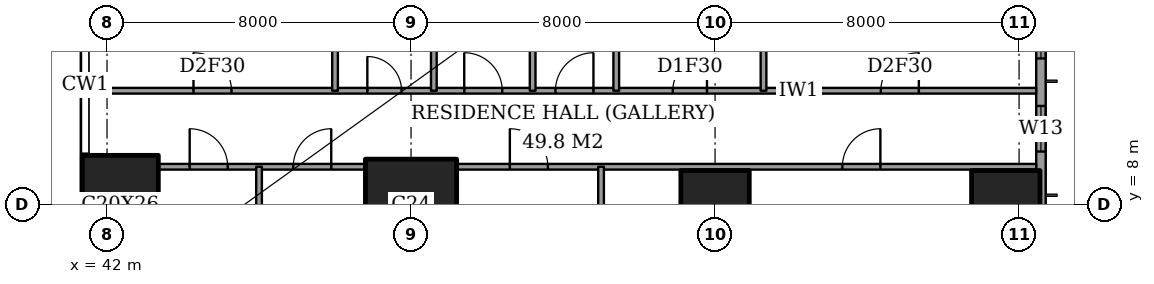
"""IFC4 building model, lengths in metres.
Left out: names, types, materials, properties, quantities, classifications, styles, units other than length and angle.
Written with IfcOpenShell. Run it as: python <this file> out.ifc"""

import sys

from ifc_helpers import new_model, si_unit, direction, frame, frame_2d, origin, origin_2d, place, context, subcontext, project, spatial, rectangle, extrude, element, fill, save


model = new_model("IFC4")
c1 = context("Model", 3, precision=1e-05, world=origin(), true_north=direction((0.0, 1.0)))
c2 = subcontext(c1, "Body", "Model", "MODEL_VIEW")
j1 = project(units=[si_unit("LENGTHUNIT", "METRE"), si_unit("PLANEANGLEUNIT", "RADIAN")], contexts=[c1])
p1 = place(None, origin())
s1 = spatial("IfcSite", under=j1, at=p1, CompositionType="ELEMENT")
p2 = place(p1, origin())
s2 = spatial("IfcBuilding", under=s1, at=p2, CompositionType="ELEMENT")
p3 = place(p2, frame((0.0, 0.0, 214.6)))
s3 = spatial("IfcBuildingStorey", under=s2, at=p3, CompositionType="ELEMENT", Elevation=214.6)
p4 = place(p3, frame((42.35, 8.0, 0.0), z_axis=(0.0, 0.0, 1.0), x_axis=(1.0, 0.0, 0.0)))
e1 = element("IfcColumn", 1, at=p4, inside=s3, PredefinedType="COLUMN", context=c2, shape_type="SweptSolid", body=[
    extrude(rectangle(XDim=2.0, YDim=2.6, at=origin_2d()), origin(), (0.0, 0.0, 1.0), 3.6),
])
p5 = place(p3, frame((50.0, 8.0, 0.0), z_axis=(0.0, 0.0, 1.0), x_axis=(1.0, 0.0, 0.0)))
e2 = element("IfcColumn", 2, at=p5, inside=s3, PredefinedType="COLUMN", context=c2, shape_type="SweptSolid", body=[
    extrude(rectangle(XDim=2.4, YDim=2.4, at=origin_2d()), origin(), (0.0, 0.0, 1.0), 3.6),
])
for number, where, z_axis, x_axis in (
    (3, (58.0, 8.0, 0.0), (0.0, 0.0, 1.0), (1.0, 0.0, 0.0)),
    (4, (65.65, 8.0, 0.0), (0.0, 0.0, 1.0), (1.0, 0.0, 0.0)),
):
    element("IfcColumn", number, at=place(p3, frame(where, z_axis=z_axis, x_axis=x_axis)), inside=s3, PredefinedType="COLUMN", context=c2, shape_type="SweptSolid", body=[
        extrude(rectangle(XDim=1.8, YDim=1.8, at=origin_2d()), origin(), (0.0, 0.0, 1.0), 3.6),
    ])
p6 = place(p3, frame((66.575, 3.175, 0.0), z_axis=(0.0, 0.0, 1.0), x_axis=(0.0, 1.0, 0.0)))
e5 = element("IfcWall", 5, at=p6, inside=s3, PredefinedType="SOLIDWALL", context=c2, shape_type="SweptSolid", body=[
    extrude(rectangle(XDim=41.65, YDim=0.25, at=frame_2d((20.825, 0.0))), origin(), (0.0, 0.0, 1.0), 3.6),
])
p7 = place(p6, frame((0.825, 0.0, 0.2)))
e6 = element("IfcOpeningElement", 6, at=p7, cuts=e5, PredefinedType="OPENING", context=c2, shape_type="SweptSolid", body=[
    extrude(rectangle(XDim=2.4, YDim=2.4, at=frame_2d((1.2, 1.2))), frame((0.0, 0.135, 0.0), z_axis=(0.0, -1.0, 0.0), x_axis=(1.0, 0.0, 0.0)), (0.0, 0.0, 1.0), 0.27),
])
p8 = place(p6, frame((6.225, 0.0, 0.2)))
e7 = element("IfcOpeningElement", 7, at=p8, cuts=e5, PredefinedType="OPENING", context=c2, shape_type="SweptSolid", body=[
    extrude(rectangle(XDim=1.2, YDim=2.4, at=frame_2d((0.6, 1.2))), frame((0.0, 0.135, 0.0), z_axis=(0.0, -1.0, 0.0), x_axis=(1.0, 0.0, 0.0)), (0.0, 0.0, 1.0), 0.27),
])
p9 = place(p6, frame((8.675, 0.0, 0.2)))
e8 = element("IfcOpeningElement", 8, at=p9, cuts=e5, PredefinedType="OPENING", context=c2, shape_type="SweptSolid", body=[
    extrude(rectangle(XDim=2.4, YDim=2.4, at=frame_2d((1.2, 1.2))), frame((0.0, 0.135, 0.0), z_axis=(0.0, -1.0, 0.0), x_axis=(1.0, 0.0, 0.0)), (0.0, 0.0, 1.0), 0.27),
])
p10 = place(p6, frame((15.675, 0.0, 0.2)))
e9 = element("IfcOpeningElement", 9, at=p10, cuts=e5, PredefinedType="OPENING", context=c2, shape_type="SweptSolid", body=[
    extrude(rectangle(XDim=2.4, YDim=2.4, at=frame_2d((1.2, 1.2))), frame((0.0, 0.135, 0.0), z_axis=(0.0, -1.0, 0.0), x_axis=(1.0, 0.0, 0.0)), (0.0, 0.0, 1.0), 0.27),
])
p11 = place(p6, frame((23.575, 0.0, 0.2)))
e10 = element("IfcOpeningElement", 10, at=p11, cuts=e5, PredefinedType="OPENING", context=c2, shape_type="SweptSolid", body=[
    extrude(rectangle(XDim=2.4, YDim=2.4, at=frame_2d((1.2, 1.2))), frame((0.0, 0.135, 0.0), z_axis=(0.0, -1.0, 0.0), x_axis=(1.0, 0.0, 0.0)), (0.0, 0.0, 1.0), 0.27),
])
p12 = place(p6, frame((30.775, 0.0, 0.2)))
e11 = element("IfcOpeningElement", 11, at=p12, cuts=e5, PredefinedType="OPENING", context=c2, shape_type="SweptSolid", body=[
    extrude(rectangle(XDim=2.4, YDim=2.4, at=frame_2d((1.2, 1.2))), frame((0.0, 0.135, 0.0), z_axis=(0.0, -1.0, 0.0), x_axis=(1.0, 0.0, 0.0)), (0.0, 0.0, 1.0), 0.27),
])
p13 = place(p6, frame((34.55, 0.0, 0.2)))
e12 = element("IfcOpeningElement", 12, at=p13, cuts=e5, PredefinedType="OPENING", context=c2, shape_type="SweptSolid", body=[
    extrude(rectangle(XDim=1.2, YDim=2.4, at=frame_2d((0.6, 1.2))), frame((0.0, 0.135, 0.0), z_axis=(0.0, -1.0, 0.0), x_axis=(1.0, 0.0, 0.0)), (0.0, 0.0, 1.0), 0.27),
])
p14 = place(p6, frame((38.425, 0.0, 0.2)))
e13 = element("IfcOpeningElement", 13, at=p14, cuts=e5, PredefinedType="OPENING", context=c2, shape_type="SweptSolid", body=[
    extrude(rectangle(XDim=2.4, YDim=2.4, at=frame_2d((1.2, 1.2))), frame((0.0, 0.135, 0.0), z_axis=(0.0, -1.0, 0.0), x_axis=(1.0, 0.0, 0.0)), (0.0, 0.0, 1.0), 0.27),
])
p15 = place(p3, frame((43.35, 9.0, 0.0), z_axis=(0.0, 0.0, 1.0), x_axis=(1.0, 0.0, 0.0)))
e14 = element("IfcWall", 14, at=p15, inside=s3, PredefinedType="PARTITIONING", context=c2, shape_type="SweptSolid", body=[
    extrude(rectangle(XDim=5.45, YDim=0.15, at=frame_2d((2.725, 0.0))), origin(), (0.0, 0.0, 1.0), 3.35),
])
p16 = place(p15, frame((3.55, 0.0, 0.0)))
e15 = element("IfcOpeningElement", 15, at=p16, cuts=e14, PredefinedType="OPENING", context=c2, shape_type="SweptSolid", body=[
    extrude(rectangle(XDim=1.0, YDim=2.1, at=frame_2d((0.5, 1.05))), frame((0.0, 0.085, 0.0), z_axis=(0.0, -1.0, 0.0), x_axis=(1.0, 0.0, 0.0)), (0.0, 0.0, 1.0), 0.17),
])
p17 = place(p15, frame((0.825, 0.0, 0.0)))
e16 = element("IfcOpeningElement", 16, at=p17, cuts=e14, PredefinedType="OPENING", context=c2, shape_type="SweptSolid", body=[
    extrude(rectangle(XDim=1.0, YDim=2.1, at=frame_2d((0.5, 1.05))), frame((0.0, 0.085, 0.0), z_axis=(0.0, -1.0, 0.0), x_axis=(1.0, 0.0, 0.0)), (0.0, 0.0, 1.0), 0.17),
])
p18 = place(p3, frame((51.2, 9.0, 0.0), z_axis=(0.0, 0.0, 1.0), x_axis=(1.0, 0.0, 0.0)))
e17 = element("IfcWall", 17, at=p18, inside=s3, PredefinedType="PARTITIONING", context=c2, shape_type="SweptSolid", body=[
    extrude(rectangle(XDim=15.25, YDim=0.15, at=frame_2d((7.625, 0.0))), origin(), (0.0, 0.0, 1.0), 3.35),
])
p19 = place(p18, frame((10.15, 0.0, 0.0)))
e18 = element("IfcOpeningElement", 18, at=p19, cuts=e17, PredefinedType="OPENING", context=c2, shape_type="SweptSolid", body=[
    extrude(rectangle(XDim=1.0, YDim=2.1, at=frame_2d((0.5, 1.05))), frame((0.0, 0.085, 0.0), z_axis=(0.0, -1.0, 0.0), x_axis=(1.0, 0.0, 0.0)), (0.0, 0.0, 1.0), 0.17),
])
p20 = place(p18, frame((1.4, 0.0, 0.0)))
e19 = element("IfcOpeningElement", 19, at=p20, cuts=e17, PredefinedType="OPENING", context=c2, shape_type="SweptSolid", body=[
    extrude(rectangle(XDim=1.0, YDim=2.1, at=frame_2d((0.5, 1.05))), frame((0.0, 0.085, 0.0), z_axis=(0.0, -1.0, 0.0), x_axis=(1.0, 0.0, 0.0)), (0.0, 0.0, 1.0), 0.17),
])
p21 = place(p3, frame((41.439, 11.0, 0.0), z_axis=(0.0, 0.0, 1.0), x_axis=(1.0, 0.0, 0.0)))
e20 = element("IfcWall", 20, at=p21, inside=s3, PredefinedType="PARTITIONING", context=c2, shape_type="SweptSolid", body=[
    extrude(rectangle(XDim=25.011, YDim=0.15, at=frame_2d((12.505, 0.0))), origin(), (0.0, 0.0, 1.0), 3.35),
])
p22 = place(p21, frame((12.361, 0.0, 0.0)))
e21 = element("IfcOpeningElement", 21, at=p22, cuts=e20, PredefinedType="OPENING", context=c2, shape_type="SweptSolid", body=[
    extrude(rectangle(XDim=1.0, YDim=2.1, at=frame_2d((0.5, 1.05))), frame((0.0, 0.085, 0.0), z_axis=(0.0, -1.0, 0.0), x_axis=(1.0, 0.0, 0.0)), (0.0, 0.0, 1.0), 0.17),
])
p23 = place(p21, frame((20.924, 0.0, 0.0)))
e22 = element("IfcOpeningElement", 22, at=p23, cuts=e20, PredefinedType="OPENING", context=c2, shape_type="SweptSolid", body=[
    extrude(rectangle(XDim=1.0, YDim=2.1, at=frame_2d((0.5, 1.05))), frame((0.0, 0.085, 0.0), z_axis=(0.0, -1.0, 0.0), x_axis=(1.0, 0.0, 0.0)), (0.0, 0.0, 1.0), 0.17),
])
p24 = place(p21, frame((15.448, 0.0, 0.0)))
e23 = element("IfcOpeningElement", 23, at=p24, cuts=e20, PredefinedType="OPENING", context=c2, shape_type="SweptSolid", body=[
    extrude(rectangle(XDim=0.9, YDim=2.1, at=frame_2d((0.45, 1.05))), frame((0.0, 0.085, 0.0), z_axis=(0.0, -1.0, 0.0), x_axis=(1.0, 0.0, 0.0)), (0.0, 0.0, 1.0), 0.17),
])
p25 = place(p21, frame((9.961, 0.0, 0.0)))
e24 = element("IfcOpeningElement", 24, at=p25, cuts=e20, PredefinedType="OPENING", context=c2, shape_type="SweptSolid", body=[
    extrude(rectangle(XDim=1.0, YDim=2.1, at=frame_2d((0.5, 1.05))), frame((0.0, 0.085, 0.0), z_axis=(0.0, -1.0, 0.0), x_axis=(1.0, 0.0, 0.0)), (0.0, 0.0, 1.0), 0.17),
])
p26 = place(p21, frame((7.411, 0.0, 0.0)))
e25 = element("IfcOpeningElement", 25, at=p26, cuts=e20, PredefinedType="OPENING", context=c2, shape_type="SweptSolid", body=[
    extrude(rectangle(XDim=0.9, YDim=2.1, at=frame_2d((0.45, 1.05))), frame((0.0, 0.085, 0.0), z_axis=(0.0, -1.0, 0.0), x_axis=(1.0, 0.0, 0.0)), (0.0, 0.0, 1.0), 0.17),
])
p27 = place(p21, frame((2.836, 0.0, 0.0)))
e26 = element("IfcOpeningElement", 26, at=p27, cuts=e20, PredefinedType="OPENING", context=c2, shape_type="SweptSolid", body=[
    extrude(rectangle(XDim=1.0, YDim=2.1, at=frame_2d((0.5, 1.05))), frame((0.0, 0.085, 0.0), z_axis=(0.0, -1.0, 0.0), x_axis=(1.0, 0.0, 0.0)), (0.0, 0.0, 1.0), 0.17),
])
p28 = place(p3, frame((46.0, -0.45, 0.0), z_axis=(0.0, 0.0, 1.0), x_axis=(0.0, 1.0, 0.0)))
e27 = element("IfcWall", 27, at=p28, inside=s3, PredefinedType="PARTITIONING", context=c2, shape_type="SweptSolid", body=[
    extrude(rectangle(XDim=9.45, YDim=0.15, at=frame_2d((4.725, 0.0))), origin(), (0.0, 0.0, 1.0), 3.35),
])
p29 = place(p3, frame((48.0, 11.0, 0.0), z_axis=(0.0, 0.0, 1.0), x_axis=(0.0, 1.0, 0.0)))
e28 = element("IfcWall", 28, at=p29, inside=s3, PredefinedType="PARTITIONING", context=c2, shape_type="SweptSolid", body=[
    extrude(rectangle(XDim=6.5, YDim=0.15, at=frame_2d((3.25, 0.0))), origin(), (0.0, 0.0, 1.0), 3.35),
])
p30 = place(p3, frame((50.6, 11.0, 0.0), z_axis=(0.0, 0.0, 1.0), x_axis=(0.0, 1.0, 0.0)))
e29 = element("IfcWall", 29, at=p30, inside=s3, PredefinedType="PARTITIONING", context=c2, shape_type="SweptSolid", body=[
    extrude(rectangle(XDim=3.8, YDim=0.15, at=frame_2d((1.9, 0.0))), origin(), (0.0, 0.0, 1.0), 3.35),
])
p31 = place(p3, frame((53.2, 11.0, 0.0), z_axis=(0.0, 0.0, 1.0), x_axis=(0.0, 1.0, 0.0)))
e30 = element("IfcWall", 30, at=p31, inside=s3, PredefinedType="PARTITIONING", context=c2, shape_type="SweptSolid", body=[
    extrude(rectangle(XDim=6.5, YDim=0.15, at=frame_2d((3.25, 0.0))), origin(), (0.0, 0.0, 1.0), 3.35),
])
p32 = place(p3, frame((55.0, -0.45, 0.0), z_axis=(0.0, 0.0, 1.0), x_axis=(0.0, 1.0, 0.0)))
e31 = element("IfcWall", 31, at=p32, inside=s3, PredefinedType="PARTITIONING", context=c2, shape_type="SweptSolid", body=[
    extrude(rectangle(XDim=9.45, YDim=0.15, at=frame_2d((4.725, 0.0))), origin(), (0.0, 0.0, 1.0), 3.35),
])
p33 = place(p3, frame((55.4, 11.0, 0.0), z_axis=(0.0, 0.0, 1.0), x_axis=(0.0, 1.0, 0.0)))
e32 = element("IfcWall", 32, at=p33, inside=s3, PredefinedType="PARTITIONING", context=c2, shape_type="SweptSolid", body=[
    extrude(rectangle(XDim=10.6, YDim=0.15, at=frame_2d((5.3, 0.0))), origin(), (0.0, 0.0, 1.0), 3.35),
])
p34 = place(p33, frame((8.05, 0.0, 0.0)))
e33 = element("IfcOpeningElement", 33, at=p34, cuts=e32, PredefinedType="OPENING", context=c2, shape_type="SweptSolid", body=[
    extrude(rectangle(XDim=1.0, YDim=2.1, at=frame_2d((0.5, 1.05))), frame((0.0, 0.085, 0.0), z_axis=(0.0, -1.0, 0.0), x_axis=(1.0, 0.0, 0.0)), (0.0, 0.0, 1.0), 0.17),
])
p35 = place(p3, frame((59.275, 11.0, 0.0), z_axis=(0.0, 0.0, 1.0), x_axis=(0.0, 1.0, 0.0)))
e34 = element("IfcWall", 34, at=p35, inside=s3, PredefinedType="PARTITIONING", context=c2, shape_type="SweptSolid", body=[
    extrude(rectangle(XDim=3.8, YDim=0.15, at=frame_2d((1.9, 0.0))), origin(), (0.0, 0.0, 1.0), 3.35),
])
p36 = place(p8, origin())
e35 = element("IfcWindow", 35, at=p36, inside=s3, PartitioningType="SINGLE_PANEL", PredefinedType="WINDOW", context=c2, shape_type="SweptSolid", body=[
    extrude(rectangle(XDim=1.2, YDim=2.4, at=frame_2d((0.6, 1.2))), frame((0.0, 0.03, 0.0), z_axis=(0.0, -1.0, 0.0), x_axis=(1.0, 0.0, 0.0)), (0.0, 0.0, 1.0), 0.06),
])
fill(e7, e35)
p37 = place(p9, origin())
e36 = element("IfcWindow", 36, at=p37, inside=s3, PartitioningType="SINGLE_PANEL", PredefinedType="WINDOW", context=c2, shape_type="SweptSolid", body=[
    extrude(rectangle(XDim=2.4, YDim=2.4, at=frame_2d((1.2, 1.2))), frame((0.0, 0.03, 0.0), z_axis=(0.0, -1.0, 0.0), x_axis=(1.0, 0.0, 0.0)), (0.0, 0.0, 1.0), 0.06),
])
fill(e8, e36)
p38 = place(p19, origin())
e37 = element("IfcDoor", 37, at=p38, inside=s3, OperationType="SINGLE_SWING_LEFT", PredefinedType="DOOR", context=c2, shape_type="SweptSolid", body=[
    extrude(rectangle(XDim=1.0, YDim=2.1, at=frame_2d((0.5, 1.05))), frame((0.0, 0.025, 0.0), z_axis=(0.0, -1.0, 0.0), x_axis=(1.0, 0.0, 0.0)), (0.0, 0.0, 1.0), 0.05),
])
fill(e18, e37)
p39 = place(p20, origin())
e38 = element("IfcDoor", 38, at=p39, inside=s3, OperationType="SINGLE_SWING_RIGHT", PredefinedType="DOOR", context=c2, shape_type="SweptSolid", body=[
    extrude(rectangle(XDim=1.0, YDim=2.1, at=frame_2d((0.5, 1.05))), frame((0.0, 0.025, 0.0), z_axis=(0.0, -1.0, 0.0), x_axis=(1.0, 0.0, 0.0)), (0.0, 0.0, 1.0), 0.05),
])
fill(e19, e38)
p40 = place(p16, origin())
e39 = element("IfcDoor", 39, at=p40, inside=s3, OperationType="SINGLE_SWING_LEFT", PredefinedType="DOOR", context=c2, shape_type="SweptSolid", body=[
    extrude(rectangle(XDim=1.0, YDim=2.1, at=frame_2d((0.5, 1.05))), frame((0.0, 0.025, 0.0), z_axis=(0.0, -1.0, 0.0), x_axis=(1.0, 0.0, 0.0)), (0.0, 0.0, 1.0), 0.05),
])
fill(e15, e39)
p41 = place(p17, origin())
e40 = element("IfcDoor", 40, at=p41, inside=s3, OperationType="SINGLE_SWING_RIGHT", PredefinedType="DOOR", context=c2, shape_type="SweptSolid", body=[
    extrude(rectangle(XDim=1.0, YDim=2.1, at=frame_2d((0.5, 1.05))), frame((0.0, 0.025, 0.0), z_axis=(0.0, -1.0, 0.0), x_axis=(1.0, 0.0, 0.0)), (0.0, 0.0, 1.0), 0.05),
])
fill(e16, e40)
p42 = place(p22, origin())
e41 = element("IfcDoor", 41, at=p42, inside=s3, OperationType="SINGLE_SWING_LEFT", PredefinedType="DOOR", context=c2, shape_type="SweptSolid", body=[
    extrude(rectangle(XDim=1.0, YDim=2.1, at=frame_2d((0.5, 1.05))), frame((0.0, 0.025, 0.0), z_axis=(0.0, -1.0, 0.0), x_axis=(1.0, 0.0, 0.0)), (0.0, 0.0, 1.0), 0.05),
])
fill(e21, e41)
p43 = place(p23, origin())
e42 = element("IfcDoor", 42, at=p43, inside=s3, OperationType="SINGLE_SWING_LEFT", PredefinedType="DOOR", context=c2, shape_type="SweptSolid", body=[
    extrude(rectangle(XDim=1.0, YDim=2.1, at=frame_2d((0.5, 1.05))), frame((0.0, 0.025, 0.0), z_axis=(0.0, -1.0, 0.0), x_axis=(1.0, 0.0, 0.0)), (0.0, 0.0, 1.0), 0.05),
])
fill(e22, e42)
p44 = place(p24, origin())
e43 = element("IfcDoor", 43, at=p44, inside=s3, OperationType="SINGLE_SWING_LEFT", PredefinedType="DOOR", context=c2, shape_type="SweptSolid", body=[
    extrude(rectangle(XDim=0.9, YDim=2.1, at=frame_2d((0.45, 1.05))), frame((0.0, 0.025, 0.0), z_axis=(0.0, -1.0, 0.0), x_axis=(1.0, 0.0, 0.0)), (0.0, 0.0, 1.0), 0.05),
])
fill(e23, e43)
p45 = place(p25, origin())
e44 = element("IfcDoor", 44, at=p45, inside=s3, OperationType="SINGLE_SWING_RIGHT", PredefinedType="DOOR", context=c2, shape_type="SweptSolid", body=[
    extrude(rectangle(XDim=1.0, YDim=2.1, at=frame_2d((0.5, 1.05))), frame((0.0, 0.025, 0.0), z_axis=(0.0, -1.0, 0.0), x_axis=(1.0, 0.0, 0.0)), (0.0, 0.0, 1.0), 0.05),
])
fill(e24, e44)
p46 = place(p26, origin())
e45 = element("IfcDoor", 45, at=p46, inside=s3, OperationType="SINGLE_SWING_RIGHT", PredefinedType="DOOR", context=c2, shape_type="SweptSolid", body=[
    extrude(rectangle(XDim=0.9, YDim=2.1, at=frame_2d((0.45, 1.05))), frame((0.0, 0.025, 0.0), z_axis=(0.0, -1.0, 0.0), x_axis=(1.0, 0.0, 0.0)), (0.0, 0.0, 1.0), 0.05),
])
fill(e25, e45)
p47 = place(p27, origin())
e46 = element("IfcDoor", 46, at=p47, inside=s3, OperationType="SINGLE_SWING_RIGHT", PredefinedType="DOOR", context=c2, shape_type="SweptSolid", body=[
    extrude(rectangle(XDim=1.0, YDim=2.1, at=frame_2d((0.5, 1.05))), frame((0.0, 0.025, 0.0), z_axis=(0.0, -1.0, 0.0), x_axis=(1.0, 0.0, 0.0)), (0.0, 0.0, 1.0), 0.05),
])
fill(e26, e46)
save(model, sys.argv[1])
